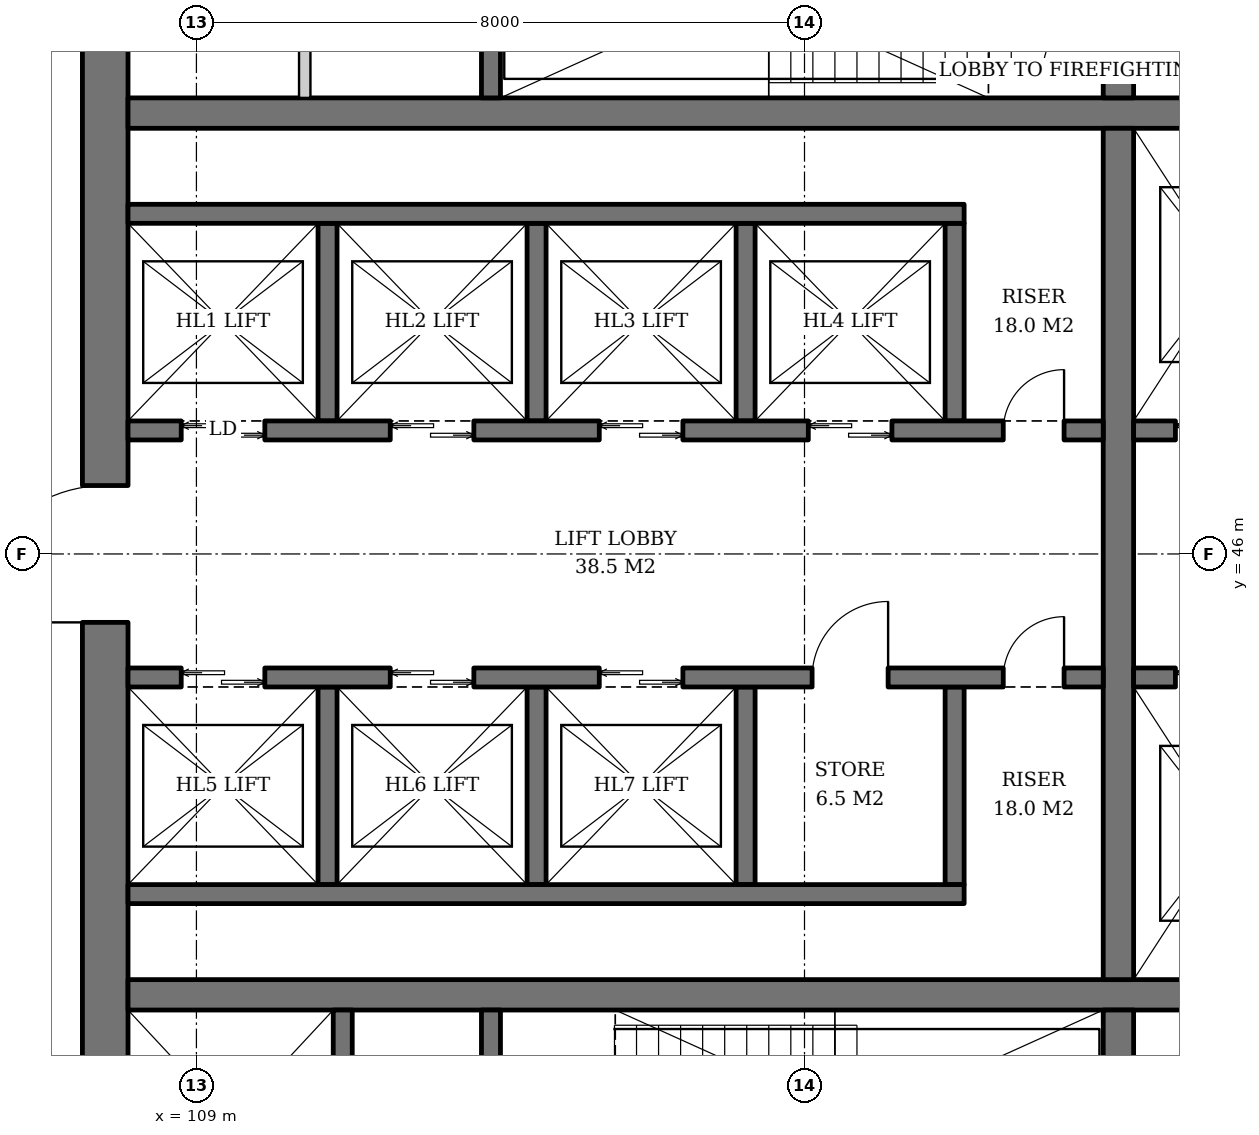
"""IFC4 building model, lengths in metres.
Left out: names, types, materials, properties, quantities, classifications, styles, units other than length and angle.
Written with IfcOpenShell. Run it as: python <this file> out.ifc"""

import sys

from ifc_helpers import new_model, si_unit, direction, frame, frame_2d, origin, place, context, subcontext, project, spatial, rectangle, extrude, element, fill, save


model = new_model("IFC4")
c1 = context("Model", 3, precision=1e-05, world=origin(), true_north=direction((0.0, 1.0)))
c2 = subcontext(c1, "Body", "Model", "MODEL_VIEW")
j1 = project(units=[si_unit("LENGTHUNIT", "METRE"), si_unit("PLANEANGLEUNIT", "RADIAN")], contexts=[c1])
p1 = place(None, origin())
s1 = spatial("IfcSite", under=j1, at=p1, CompositionType="ELEMENT")
p2 = place(p1, origin())
s2 = spatial("IfcBuilding", under=s1, at=p2, CompositionType="ELEMENT")
p3 = place(p2, frame((0.0, 0.0, 93.2)))
s3 = spatial("IfcBuildingStorey", under=s2, at=p3, CompositionType="ELEMENT", Elevation=93.2)
p4 = place(p3, frame((107.8, 37.1, 0.0), z_axis=(0.0, 0.0, 1.0), x_axis=(0.0, 1.0, 0.0)))
e1 = element("IfcWall", 1, at=p4, inside=s3, PredefinedType="SHEAR", context=c2, shape_type="SweptSolid", body=[
    extrude(rectangle(XDim=17.8, YDim=0.6, at=frame_2d((8.9, 0.0))), origin(), (0.0, 0.0, 1.0), 3.8),
])
p5 = place(p4, frame((8.0, 0.0, 0.0)))
e2 = element("IfcOpeningElement", 2, at=p5, cuts=e1, PredefinedType="OPENING", context=c2, shape_type="SweptSolid", body=[
    extrude(rectangle(XDim=1.8, YDim=2.4, at=frame_2d((0.9, 1.2))), frame((0.0, 0.31, 0.0), z_axis=(0.0, -1.0, 0.0), x_axis=(1.0, 0.0, 0.0)), (0.0, 0.0, 1.0), 0.62),
])
for number, where, z_axis, x_axis in (
    (3, (108.1, 40.2, 0.0), (0.0, 0.0, 1.0), (1.0, 0.0, 0.0)),
    (4, (108.1, 51.8, 0.0), (0.0, 0.0, 1.0), (1.0, 0.0, 0.0)),
):
    element("IfcWall", number, at=place(p3, frame(where, z_axis=z_axis, x_axis=x_axis)), inside=s3, PredefinedType="SHEAR", context=c2, shape_type="SweptSolid", body=[
        extrude(rectangle(XDim=17.8, YDim=0.4, at=frame_2d((8.9, 0.0))), origin(), (0.0, 0.0, 1.0), 3.8),
    ])
p6 = place(p3, frame((121.13, 37.1, 0.0), z_axis=(0.0, 0.0, 1.0), x_axis=(0.0, 1.0, 0.0)))
e5 = element("IfcWall", 5, at=p6, inside=s3, PredefinedType="SHEAR", context=c2, shape_type="SweptSolid", body=[
    extrude(rectangle(XDim=2.9, YDim=0.4, at=frame_2d((1.45, 0.0))), origin(), (0.0, 0.0, 1.0), 3.8),
])
p7 = place(p3, frame((121.13, 40.4, 0.0), z_axis=(0.0, 0.0, 1.0), x_axis=(0.0, 1.0, 0.0)))
e6 = element("IfcWall", 6, at=p7, inside=s3, PredefinedType="SHEAR", context=c2, shape_type="SweptSolid", body=[
    extrude(rectangle(XDim=11.2, YDim=0.4, at=frame_2d((5.6, 0.0))), origin(), (0.0, 0.0, 1.0), 3.8),
])
p8 = place(p3, frame((121.13, 52.0, 0.0), z_axis=(0.0, 0.0, 1.0), x_axis=(0.0, 1.0, 0.0)))
e7 = element("IfcWall", 7, at=p8, inside=s3, PredefinedType="SHEAR", context=c2, shape_type="SweptSolid", body=[
    extrude(rectangle(XDim=2.9, YDim=0.4, at=frame_2d((1.45, 0.0))), origin(), (0.0, 0.0, 1.0), 3.8),
])
p9 = place(p8, frame((0.3, 0.0, 0.0)))
e8 = element("IfcOpeningElement", 8, at=p9, cuts=e7, PredefinedType="OPENING", context=c2, shape_type="SweptSolid", body=[
    extrude(rectangle(XDim=1.0, YDim=2.1, at=frame_2d((0.5, 1.05))), frame((0.0, 0.21, 0.0), z_axis=(0.0, -1.0, 0.0), x_axis=(1.0, 0.0, 0.0)), (0.0, 0.0, 1.0), 0.42),
])
p10 = place(p3, frame((110.925, 37.1, 0.0), z_axis=(0.0, 0.0, 1.0), x_axis=(0.0, 1.0, 0.0)))
e9 = element("IfcWall", 9, at=p10, inside=s3, PredefinedType="SHEAR", context=c2, shape_type="SweptSolid", body=[
    extrude(rectangle(XDim=2.9, YDim=0.25, at=frame_2d((1.45, 0.0))), origin(), (0.0, 0.0, 1.0), 3.8),
])
p11 = place(p10, frame((0.8, 0.0, 0.0)))
e10 = element("IfcOpeningElement", 10, at=p11, cuts=e9, PredefinedType="OPENING", context=c2, shape_type="SweptSolid", body=[
    extrude(rectangle(XDim=1.3, YDim=2.2, at=frame_2d((0.65, 1.1))), frame((0.0, 0.135, 0.0), z_axis=(0.0, -1.0, 0.0), x_axis=(1.0, 0.0, 0.0)), (0.0, 0.0, 1.0), 0.27),
])
p12 = place(p3, frame((112.875, 37.1, 0.0), z_axis=(0.0, 0.0, 1.0), x_axis=(0.0, 1.0, 0.0)))
e11 = element("IfcWall", 11, at=p12, inside=s3, PredefinedType="SHEAR", context=c2, shape_type="SweptSolid", body=[
    extrude(rectangle(XDim=2.9, YDim=0.25, at=frame_2d((1.45, 0.0))), origin(), (0.0, 0.0, 1.0), 3.8),
])
p13 = place(p12, frame((0.75, 0.0, 0.0)))
e12 = element("IfcOpeningElement", 12, at=p13, cuts=e11, PredefinedType="OPENING", context=c2, shape_type="SweptSolid", body=[
    extrude(rectangle(XDim=1.2, YDim=2.1, at=frame_2d((0.6, 1.05))), frame((0.0, 0.135, 0.0), z_axis=(0.0, -1.0, 0.0), x_axis=(1.0, 0.0, 0.0)), (0.0, 0.0, 1.0), 0.27),
])
p14 = place(p3, frame((112.875, 52.0, 0.0), z_axis=(0.0, 0.0, 1.0), x_axis=(0.0, 1.0, 0.0)))
e13 = element("IfcWall", 13, at=p14, inside=s3, PredefinedType="SHEAR", context=c2, shape_type="SweptSolid", body=[
    extrude(rectangle(XDim=2.9, YDim=0.25, at=frame_2d((1.45, 0.0))), origin(), (0.0, 0.0, 1.0), 3.8),
])
for number, where, z_axis, x_axis in (
    (14, (110.725, 47.75, 0.0), (0.0, 0.0, 1.0), (0.0, 1.0, 0.0)),
    (15, (113.475, 47.75, 0.0), (0.0, 0.0, 1.0), (0.0, 1.0, 0.0)),
    (16, (116.225, 47.75, 0.0), (0.0, 0.0, 1.0), (0.0, 1.0, 0.0)),
    (17, (118.975, 47.75, 0.0), (0.0, 0.0, 1.0), (0.0, 1.0, 0.0)),
):
    element("IfcWall", number, at=place(p3, frame(where, z_axis=z_axis, x_axis=x_axis)), inside=s3, PredefinedType="SHEAR", context=c2, shape_type="SweptSolid", body=[
        extrude(rectangle(XDim=2.6, YDim=0.25, at=frame_2d((1.3, 0.0))), origin(), (0.0, 0.0, 1.0), 3.8),
    ])
p15 = place(p3, frame((108.1, 50.475, 0.0), z_axis=(0.0, 0.0, 1.0), x_axis=(1.0, 0.0, 0.0)))
e18 = element("IfcWall", 18, at=p15, inside=s3, PredefinedType="SHEAR", context=c2, shape_type="SweptSolid", body=[
    extrude(rectangle(XDim=11.0, YDim=0.25, at=frame_2d((5.5, 0.0))), origin(), (0.0, 0.0, 1.0), 3.8),
])
p16 = place(p3, frame((108.1, 47.625, 0.0), z_axis=(0.0, 0.0, 1.0), x_axis=(1.0, 0.0, 0.0)))
e19 = element("IfcWall", 19, at=p16, inside=s3, PredefinedType="SHEAR", context=c2, shape_type="SweptSolid", body=[
    extrude(rectangle(XDim=12.83, YDim=0.25, at=frame_2d((6.415, 0.0))), origin(), (0.0, 0.0, 1.0), 3.8),
])
p17 = place(p16, frame((0.7, 0.0, 0.0)))
e20 = element("IfcOpeningElement", 20, at=p17, cuts=e19, PredefinedType="OPENING", context=c2, shape_type="SweptSolid", body=[
    extrude(rectangle(XDim=1.1, YDim=2.2, at=frame_2d((0.55, 1.1))), frame((0.0, 0.135, 0.0), z_axis=(0.0, -1.0, 0.0), x_axis=(1.0, 0.0, 0.0)), (0.0, 0.0, 1.0), 0.27),
])
p18 = place(p16, frame((3.45, 0.0, 0.0)))
e21 = element("IfcOpeningElement", 21, at=p18, cuts=e19, PredefinedType="OPENING", context=c2, shape_type="SweptSolid", body=[
    extrude(rectangle(XDim=1.1, YDim=2.2, at=frame_2d((0.55, 1.1))), frame((0.0, 0.135, 0.0), z_axis=(0.0, -1.0, 0.0), x_axis=(1.0, 0.0, 0.0)), (0.0, 0.0, 1.0), 0.27),
])
p19 = place(p16, frame((6.2, 0.0, 0.0)))
e22 = element("IfcOpeningElement", 22, at=p19, cuts=e19, PredefinedType="OPENING", context=c2, shape_type="SweptSolid", body=[
    extrude(rectangle(XDim=1.1, YDim=2.2, at=frame_2d((0.55, 1.1))), frame((0.0, 0.135, 0.0), z_axis=(0.0, -1.0, 0.0), x_axis=(1.0, 0.0, 0.0)), (0.0, 0.0, 1.0), 0.27),
])
p20 = place(p16, frame((8.95, 0.0, 0.0)))
e23 = element("IfcOpeningElement", 23, at=p20, cuts=e19, PredefinedType="OPENING", context=c2, shape_type="SweptSolid", body=[
    extrude(rectangle(XDim=1.1, YDim=2.2, at=frame_2d((0.55, 1.1))), frame((0.0, 0.135, 0.0), z_axis=(0.0, -1.0, 0.0), x_axis=(1.0, 0.0, 0.0)), (0.0, 0.0, 1.0), 0.27),
])
p21 = place(p16, frame((11.515, 0.0, 0.0)))
e24 = element("IfcOpeningElement", 24, at=p21, cuts=e19, PredefinedType="OPENING", context=c2, shape_type="SweptSolid", body=[
    extrude(rectangle(XDim=0.8, YDim=2.0, at=frame_2d((0.4, 1.0))), frame((0.0, 0.135, 0.0), z_axis=(0.0, -1.0, 0.0), x_axis=(1.0, 0.0, 0.0)), (0.0, 0.0, 1.0), 0.27),
])
for number, where, z_axis, x_axis in (
    (25, (110.725, 44.25, 0.0), (0.0, 0.0, 1.0), (0.0, -1.0, 0.0)),
    (26, (113.475, 44.25, 0.0), (0.0, 0.0, 1.0), (0.0, -1.0, 0.0)),
    (27, (116.225, 44.25, 0.0), (0.0, 0.0, 1.0), (0.0, -1.0, 0.0)),
    (28, (118.975, 44.25, 0.0), (0.0, 0.0, 1.0), (0.0, -1.0, 0.0)),
):
    element("IfcWall", number, at=place(p3, frame(where, z_axis=z_axis, x_axis=x_axis)), inside=s3, PredefinedType="SHEAR", context=c2, shape_type="SweptSolid", body=[
        extrude(rectangle(XDim=2.6, YDim=0.25, at=frame_2d((1.3, 0.0))), origin(), (0.0, 0.0, 1.0), 3.8),
    ])
p22 = place(p3, frame((108.1, 41.525, 0.0), z_axis=(0.0, 0.0, 1.0), x_axis=(1.0, 0.0, 0.0)))
e29 = element("IfcWall", 29, at=p22, inside=s3, PredefinedType="SHEAR", context=c2, shape_type="SweptSolid", body=[
    extrude(rectangle(XDim=11.0, YDim=0.25, at=frame_2d((5.5, 0.0))), origin(), (0.0, 0.0, 1.0), 3.8),
])
p23 = place(p3, frame((108.1, 44.375, 0.0), z_axis=(0.0, 0.0, 1.0), x_axis=(1.0, 0.0, 0.0)))
e30 = element("IfcWall", 30, at=p23, inside=s3, PredefinedType="SHEAR", context=c2, shape_type="SweptSolid", body=[
    extrude(rectangle(XDim=12.83, YDim=0.25, at=frame_2d((6.415, 0.0))), origin(), (0.0, 0.0, 1.0), 3.8),
])
p24 = place(p23, frame((0.7, 0.0, 0.0)))
e31 = element("IfcOpeningElement", 31, at=p24, cuts=e30, PredefinedType="OPENING", context=c2, shape_type="SweptSolid", body=[
    extrude(rectangle(XDim=1.1, YDim=2.2, at=frame_2d((0.55, 1.1))), frame((0.0, 0.135, 0.0), z_axis=(0.0, -1.0, 0.0), x_axis=(1.0, 0.0, 0.0)), (0.0, 0.0, 1.0), 0.27),
])
p25 = place(p23, frame((3.45, 0.0, 0.0)))
e32 = element("IfcOpeningElement", 32, at=p25, cuts=e30, PredefinedType="OPENING", context=c2, shape_type="SweptSolid", body=[
    extrude(rectangle(XDim=1.1, YDim=2.2, at=frame_2d((0.55, 1.1))), frame((0.0, 0.135, 0.0), z_axis=(0.0, -1.0, 0.0), x_axis=(1.0, 0.0, 0.0)), (0.0, 0.0, 1.0), 0.27),
])
p26 = place(p23, frame((6.2, 0.0, 0.0)))
e33 = element("IfcOpeningElement", 33, at=p26, cuts=e30, PredefinedType="OPENING", context=c2, shape_type="SweptSolid", body=[
    extrude(rectangle(XDim=1.1, YDim=2.2, at=frame_2d((0.55, 1.1))), frame((0.0, 0.135, 0.0), z_axis=(0.0, -1.0, 0.0), x_axis=(1.0, 0.0, 0.0)), (0.0, 0.0, 1.0), 0.27),
])
p27 = place(p23, frame((9.0, 0.0, 0.0)))
e34 = element("IfcOpeningElement", 34, at=p27, cuts=e30, PredefinedType="OPENING", context=c2, shape_type="SweptSolid", body=[
    extrude(rectangle(XDim=1.0, YDim=2.1, at=frame_2d((0.5, 1.05))), frame((0.0, 0.135, 0.0), z_axis=(0.0, -1.0, 0.0), x_axis=(1.0, 0.0, 0.0)), (0.0, 0.0, 1.0), 0.27),
])
p28 = place(p23, frame((11.515, 0.0, 0.0)))
e35 = element("IfcOpeningElement", 35, at=p28, cuts=e30, PredefinedType="OPENING", context=c2, shape_type="SweptSolid", body=[
    extrude(rectangle(XDim=0.8, YDim=2.0, at=frame_2d((0.4, 1.0))), frame((0.0, 0.135, 0.0), z_axis=(0.0, -1.0, 0.0), x_axis=(1.0, 0.0, 0.0)), (0.0, 0.0, 1.0), 0.27),
])
p29 = place(p3, frame((121.33, 47.625, 0.0), z_axis=(0.0, 0.0, 1.0), x_axis=(1.0, 0.0, 0.0)))
e36 = element("IfcWall", 36, at=p29, inside=s3, PredefinedType="SHEAR", context=c2, shape_type="SweptSolid", body=[
    extrude(rectangle(XDim=4.57, YDim=0.25, at=frame_2d((2.285, 0.0))), origin(), (0.0, 0.0, 1.0), 3.8),
])
p30 = place(p29, frame((0.55, 0.0, 0.0)))
e37 = element("IfcOpeningElement", 37, at=p30, cuts=e36, PredefinedType="OPENING", context=c2, shape_type="SweptSolid", body=[
    extrude(rectangle(XDim=1.4, YDim=2.4, at=frame_2d((0.7, 1.2))), frame((0.0, 0.135, 0.0), z_axis=(0.0, -1.0, 0.0), x_axis=(1.0, 0.0, 0.0)), (0.0, 0.0, 1.0), 0.27),
])
p31 = place(p29, frame((3.26, 0.0, 0.0)))
e38 = element("IfcOpeningElement", 38, at=p31, cuts=e36, PredefinedType="OPENING", context=c2, shape_type="SweptSolid", body=[
    extrude(rectangle(XDim=0.8, YDim=2.0, at=frame_2d((0.4, 1.0))), frame((0.0, 0.135, 0.0), z_axis=(0.0, -1.0, 0.0), x_axis=(1.0, 0.0, 0.0)), (0.0, 0.0, 1.0), 0.27),
])
p32 = place(p3, frame((121.33, 44.375, 0.0), z_axis=(0.0, 0.0, 1.0), x_axis=(1.0, 0.0, 0.0)))
e39 = element("IfcWall", 39, at=p32, inside=s3, PredefinedType="SHEAR", context=c2, shape_type="SweptSolid", body=[
    extrude(rectangle(XDim=4.57, YDim=0.25, at=frame_2d((2.285, 0.0))), origin(), (0.0, 0.0, 1.0), 3.8),
])
p33 = place(p32, frame((0.55, 0.0, 0.0)))
e40 = element("IfcOpeningElement", 40, at=p33, cuts=e39, PredefinedType="OPENING", context=c2, shape_type="SweptSolid", body=[
    extrude(rectangle(XDim=1.4, YDim=2.4, at=frame_2d((0.7, 1.2))), frame((0.0, 0.135, 0.0), z_axis=(0.0, -1.0, 0.0), x_axis=(1.0, 0.0, 0.0)), (0.0, 0.0, 1.0), 0.27),
])
p34 = place(p32, frame((3.26, 0.0, 0.0)))
e41 = element("IfcOpeningElement", 41, at=p34, cuts=e39, PredefinedType="OPENING", context=c2, shape_type="SweptSolid", body=[
    extrude(rectangle(XDim=0.8, YDim=2.0, at=frame_2d((0.4, 1.0))), frame((0.0, 0.135, 0.0), z_axis=(0.0, -1.0, 0.0), x_axis=(1.0, 0.0, 0.0)), (0.0, 0.0, 1.0), 0.27),
])
p35 = place(p3, frame((110.425, 52.0, 0.0), z_axis=(0.0, 0.0, 1.0), x_axis=(0.0, 1.0, 0.0)))
e42 = element("IfcWall", 42, at=p35, inside=s3, PredefinedType="SOLIDWALL", context=c2, shape_type="SweptSolid", body=[
    extrude(rectangle(XDim=2.9, YDim=0.15, at=frame_2d((1.45, 0.0))), origin(), (0.0, 0.0, 1.0), 3.6),
])
p36 = place(p17, origin())
e43 = element("IfcDoor", 43, at=p36, inside=s3, OperationType="DOUBLE_DOOR_SLIDING", PredefinedType="DOOR", context=c2, shape_type="SweptSolid", body=[
    extrude(rectangle(XDim=1.1, YDim=2.2, at=frame_2d((0.55, 1.1))), frame((0.0, 0.025, 0.0), z_axis=(0.0, -1.0, 0.0), x_axis=(1.0, 0.0, 0.0)), (0.0, 0.0, 1.0), 0.05),
])
fill(e20, e43)
p37 = place(p18, origin())
e44 = element("IfcDoor", 44, at=p37, inside=s3, OperationType="DOUBLE_DOOR_SLIDING", PredefinedType="DOOR", context=c2, shape_type="SweptSolid", body=[
    extrude(rectangle(XDim=1.1, YDim=2.2, at=frame_2d((0.55, 1.1))), frame((0.0, 0.025, 0.0), z_axis=(0.0, -1.0, 0.0), x_axis=(1.0, 0.0, 0.0)), (0.0, 0.0, 1.0), 0.05),
])
fill(e21, e44)
p38 = place(p19, origin())
e45 = element("IfcDoor", 45, at=p38, inside=s3, OperationType="DOUBLE_DOOR_SLIDING", PredefinedType="DOOR", context=c2, shape_type="SweptSolid", body=[
    extrude(rectangle(XDim=1.1, YDim=2.2, at=frame_2d((0.55, 1.1))), frame((0.0, 0.025, 0.0), z_axis=(0.0, -1.0, 0.0), x_axis=(1.0, 0.0, 0.0)), (0.0, 0.0, 1.0), 0.05),
])
fill(e22, e45)
p39 = place(p20, origin())
e46 = element("IfcDoor", 46, at=p39, inside=s3, OperationType="DOUBLE_DOOR_SLIDING", PredefinedType="DOOR", context=c2, shape_type="SweptSolid", body=[
    extrude(rectangle(XDim=1.1, YDim=2.2, at=frame_2d((0.55, 1.1))), frame((0.0, 0.025, 0.0), z_axis=(0.0, -1.0, 0.0), x_axis=(1.0, 0.0, 0.0)), (0.0, 0.0, 1.0), 0.05),
])
fill(e23, e46)
p40 = place(p21, origin())
e47 = element("IfcDoor", 47, at=p40, inside=s3, OperationType="SINGLE_SWING_RIGHT", PredefinedType="DOOR", context=c2, shape_type="SweptSolid", body=[
    extrude(rectangle(XDim=0.8, YDim=2.0, at=frame_2d((0.4, 1.0))), frame((0.0, 0.025, 0.0), z_axis=(0.0, -1.0, 0.0), x_axis=(1.0, 0.0, 0.0)), (0.0, 0.0, 1.0), 0.05),
])
fill(e24, e47)
p41 = place(p24, origin())
e48 = element("IfcDoor", 48, at=p41, inside=s3, OperationType="DOUBLE_DOOR_SLIDING", PredefinedType="DOOR", context=c2, shape_type="SweptSolid", body=[
    extrude(rectangle(XDim=1.1, YDim=2.2, at=frame_2d((0.55, 1.1))), frame((0.0, 0.025, 0.0), z_axis=(0.0, -1.0, 0.0), x_axis=(1.0, 0.0, 0.0)), (0.0, 0.0, 1.0), 0.05),
])
fill(e31, e48)
p42 = place(p25, origin())
e49 = element("IfcDoor", 49, at=p42, inside=s3, OperationType="DOUBLE_DOOR_SLIDING", PredefinedType="DOOR", context=c2, shape_type="SweptSolid", body=[
    extrude(rectangle(XDim=1.1, YDim=2.2, at=frame_2d((0.55, 1.1))), frame((0.0, 0.025, 0.0), z_axis=(0.0, -1.0, 0.0), x_axis=(1.0, 0.0, 0.0)), (0.0, 0.0, 1.0), 0.05),
])
fill(e32, e49)
p43 = place(p26, origin())
e50 = element("IfcDoor", 50, at=p43, inside=s3, OperationType="DOUBLE_DOOR_SLIDING", PredefinedType="DOOR", context=c2, shape_type="SweptSolid", body=[
    extrude(rectangle(XDim=1.1, YDim=2.2, at=frame_2d((0.55, 1.1))), frame((0.0, 0.025, 0.0), z_axis=(0.0, -1.0, 0.0), x_axis=(1.0, 0.0, 0.0)), (0.0, 0.0, 1.0), 0.05),
])
fill(e33, e50)
p44 = place(p27, origin())
e51 = element("IfcDoor", 51, at=p44, inside=s3, OperationType="SINGLE_SWING_RIGHT", PredefinedType="DOOR", context=c2, shape_type="SweptSolid", body=[
    extrude(rectangle(XDim=1.0, YDim=2.1, at=frame_2d((0.5, 1.05))), frame((0.0, 0.025, 0.0), z_axis=(0.0, -1.0, 0.0), x_axis=(1.0, 0.0, 0.0)), (0.0, 0.0, 1.0), 0.05),
])
fill(e34, e51)
p45 = place(p28, origin())
e52 = element("IfcDoor", 52, at=p45, inside=s3, OperationType="SINGLE_SWING_RIGHT", PredefinedType="DOOR", context=c2, shape_type="SweptSolid", body=[
    extrude(rectangle(XDim=0.8, YDim=2.0, at=frame_2d((0.4, 1.0))), frame((0.0, 0.025, 0.0), z_axis=(0.0, -1.0, 0.0), x_axis=(1.0, 0.0, 0.0)), (0.0, 0.0, 1.0), 0.05),
])
fill(e35, e52)
p46 = place(p30, origin())
e53 = element("IfcDoor", 53, at=p46, inside=s3, OperationType="DOUBLE_DOOR_SLIDING", PredefinedType="DOOR", context=c2, shape_type="SweptSolid", body=[
    extrude(rectangle(XDim=1.4, YDim=2.4, at=frame_2d((0.7, 1.2))), frame((0.0, 0.025, 0.0), z_axis=(0.0, -1.0, 0.0), x_axis=(1.0, 0.0, 0.0)), (0.0, 0.0, 1.0), 0.05),
])
fill(e37, e53)
p47 = place(p33, origin())
e54 = element("IfcDoor", 54, at=p47, inside=s3, OperationType="DOUBLE_DOOR_SLIDING", PredefinedType="DOOR", context=c2, shape_type="SweptSolid", body=[
    extrude(rectangle(XDim=1.4, YDim=2.4, at=frame_2d((0.7, 1.2))), frame((0.0, 0.025, 0.0), z_axis=(0.0, -1.0, 0.0), x_axis=(1.0, 0.0, 0.0)), (0.0, 0.0, 1.0), 0.05),
])
fill(e40, e54)
p48 = place(p9, origin())
e55 = element("IfcDoor", 55, at=p48, inside=s3, OperationType="SINGLE_SWING_LEFT", PredefinedType="DOOR", context=c2, shape_type="SweptSolid", body=[
    extrude(rectangle(XDim=1.0, YDim=2.1, at=frame_2d((0.5, 1.05))), frame((0.0, 0.025, 0.0), z_axis=(0.0, -1.0, 0.0), x_axis=(1.0, 0.0, 0.0)), (0.0, 0.0, 1.0), 0.05),
])
fill(e8, e55)
p49 = place(p5, origin())
e56 = element("IfcDoor", 56, at=p49, inside=s3, OperationType="DOUBLE_DOOR_SINGLE_SWING", PredefinedType="DOOR", context=c2, shape_type="SweptSolid", body=[
    extrude(rectangle(XDim=1.8, YDim=2.4, at=frame_2d((0.9, 1.2))), frame((0.0, 0.025, 0.0), z_axis=(0.0, -1.0, 0.0), x_axis=(1.0, 0.0, 0.0)), (0.0, 0.0, 1.0), 0.05),
])
fill(e2, e56)
save(model, sys.argv[1])
